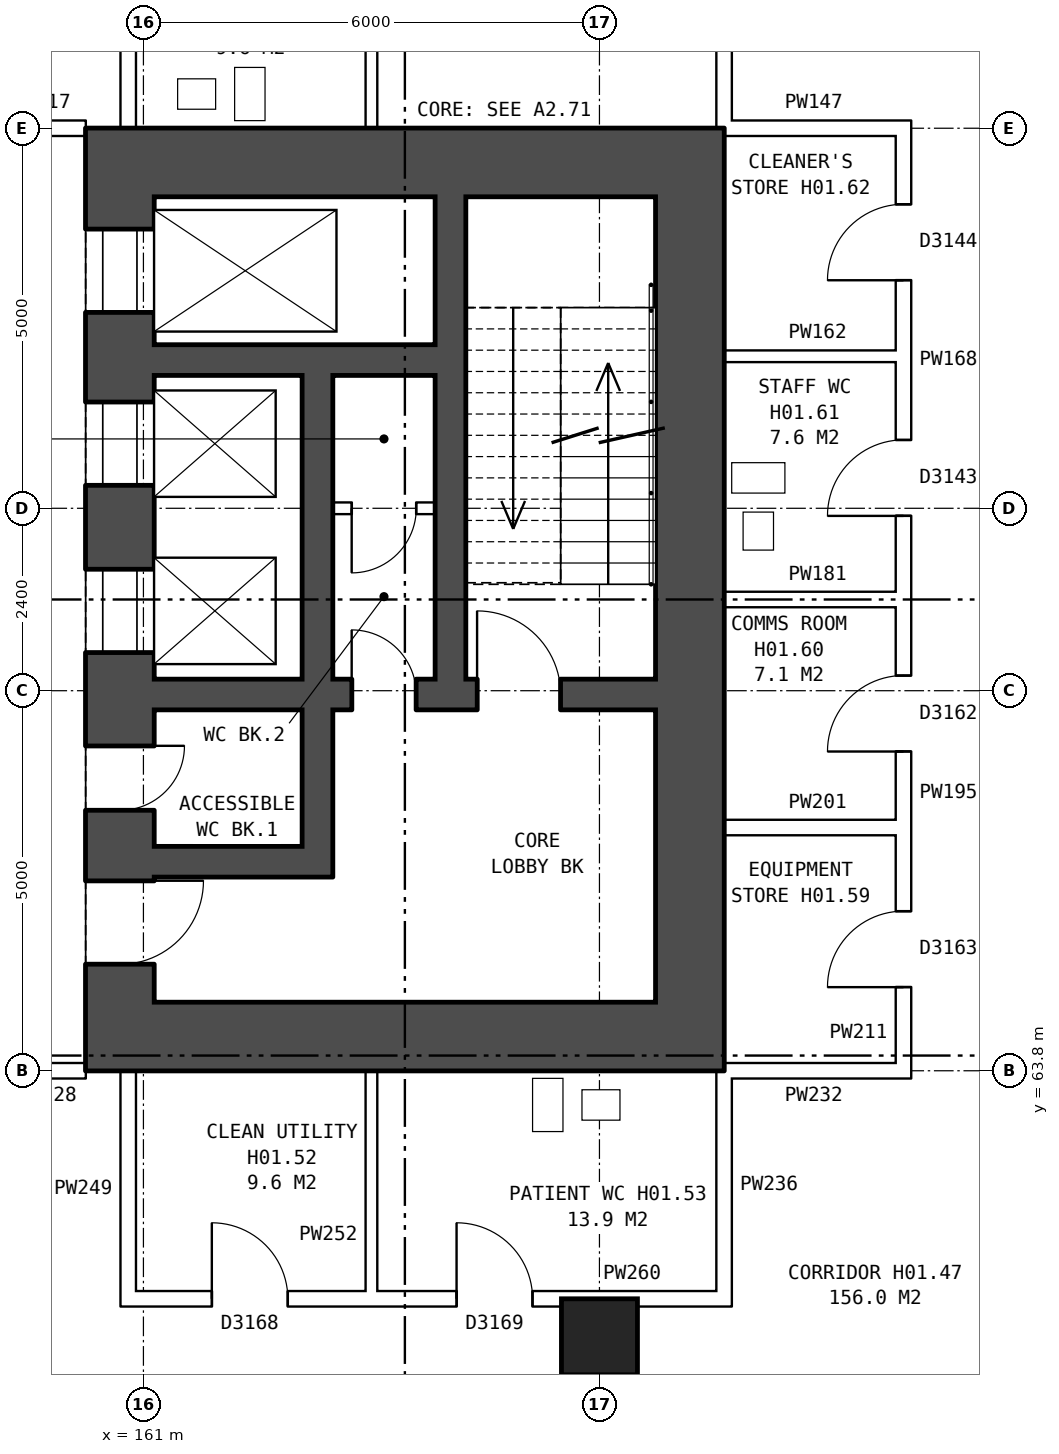
"""IFC4 building model, lengths in metres.
Left out: names, types, materials, properties, quantities, classifications, styles, units other than length and angle.
Written with IfcOpenShell. Run it as: python <this file> out.ifc"""

import sys

from ifc_helpers import new_model, si_unit, direction, frame, frame_2d, origin, origin_2d, place, context, subcontext, project, spatial, rectangle, extrude, element, fill, save


model = new_model("IFC4")
c1 = context("Model", 3, precision=1e-05, world=origin(), true_north=direction((0.0, 1.0)))
c2 = subcontext(c1, "Body", "Model", "MODEL_VIEW")
j1 = project(units=[si_unit("LENGTHUNIT", "METRE"), si_unit("PLANEANGLEUNIT", "RADIAN")], contexts=[c1])
p1 = place(None, origin())
s1 = spatial("IfcSite", under=j1, at=p1, CompositionType="ELEMENT")
p2 = place(p1, origin())
s2 = spatial("IfcBuilding", under=s1, at=p2, CompositionType="ELEMENT")
p3 = place(p2, frame((0.0, 0.0, 5.5)))
s3 = spatial("IfcBuildingStorey", under=s2, at=p3, CompositionType="ELEMENT", Elevation=5.5)
p4 = place(p3, frame((167.0, 60.3, 0.0), z_axis=(0.0, 0.0, 1.0), x_axis=(1.0, 0.0, 0.0)))
e1 = element("IfcColumn", 1, at=p4, inside=s3, PredefinedType="COLUMN", context=c2, shape_type="SweptSolid", body=[
    extrude(rectangle(XDim=1.0, YDim=1.0, at=origin_2d()), origin(), (0.0, 0.0, 1.0), 4.3),
])
p5 = place(p3, frame((160.69, 75.3, 0.0), z_axis=(0.0, 0.0, 1.0), x_axis=(0.0, -1.0, 0.0)))
e2 = element("IfcWall", 2, at=p5, inside=s3, PredefinedType="SHEAR", context=c2, shape_type="SweptSolid", body=[
    extrude(rectangle(XDim=10.6, YDim=0.9, at=frame_2d((5.3, 0.0))), origin(), (0.0, 0.0, 1.0), 4.3),
])
p6 = place(p5, frame((0.425, 0.0, 0.0)))
e3 = element("IfcOpeningElement", 3, at=p6, cuts=e2, PredefinedType="OPENING", context=c2, shape_type="SweptSolid", body=[
    extrude(rectangle(XDim=1.1, YDim=2.1, at=frame_2d((0.55, 1.05))), frame((0.0, 0.46, 0.0), z_axis=(0.0, -1.0, 0.0), x_axis=(1.0, 0.0, 0.0)), (0.0, 0.0, 1.0), 0.92),
])
p7 = place(p5, frame((2.7, 0.0, 0.0)))
e4 = element("IfcOpeningElement", 4, at=p7, cuts=e2, PredefinedType="OPENING", context=c2, shape_type="SweptSolid", body=[
    extrude(rectangle(XDim=1.1, YDim=2.1, at=frame_2d((0.55, 1.05))), frame((0.0, 0.46, 0.0), z_axis=(0.0, -1.0, 0.0), x_axis=(1.0, 0.0, 0.0)), (0.0, 0.0, 1.0), 0.92),
])
p8 = place(p5, frame((4.9, 0.0, 0.0)))
e5 = element("IfcOpeningElement", 5, at=p8, cuts=e2, PredefinedType="OPENING", context=c2, shape_type="SweptSolid", body=[
    extrude(rectangle(XDim=1.1, YDim=2.1, at=frame_2d((0.55, 1.05))), frame((0.0, 0.46, 0.0), z_axis=(0.0, -1.0, 0.0), x_axis=(1.0, 0.0, 0.0)), (0.0, 0.0, 1.0), 0.92),
])
p9 = place(p5, frame((9.0, 0.0, 0.0)))
e6 = element("IfcOpeningElement", 6, at=p9, cuts=e2, PredefinedType="OPENING", context=c2, shape_type="SweptSolid", body=[
    extrude(rectangle(XDim=1.1, YDim=2.1, at=frame_2d((0.55, 1.05))), frame((0.0, 0.46, 0.0), z_axis=(0.0, -1.0, 0.0), x_axis=(1.0, 0.0, 0.0)), (0.0, 0.0, 1.0), 0.92),
])
p10 = place(p5, frame((7.225, 0.0, 0.0)))
e7 = element("IfcOpeningElement", 7, at=p10, cuts=e2, PredefinedType="OPENING", context=c2, shape_type="SweptSolid", body=[
    extrude(rectangle(XDim=0.85, YDim=2.1, at=frame_2d((0.425, 1.05))), frame((0.0, 0.46, 0.0), z_axis=(0.0, -1.0, 0.0), x_axis=(1.0, 0.0, 0.0)), (0.0, 0.0, 1.0), 0.92),
])
p11 = place(p3, frame((168.19, 75.3, 0.0), z_axis=(0.0, 0.0, 1.0), x_axis=(0.0, -1.0, 0.0)))
e8 = element("IfcWall", 8, at=p11, inside=s3, PredefinedType="SHEAR", context=c2, shape_type="SweptSolid", body=[
    extrude(rectangle(XDim=10.6, YDim=0.9, at=frame_2d((5.3, 0.0))), origin(), (0.0, 0.0, 1.0), 4.3),
])
for number, where, z_axis, x_axis in (
    (9, (160.24, 75.75, 0.0), (0.0, 0.0, 1.0), (1.0, 0.0, 0.0)),
    (10, (160.24, 64.25, 0.0), (0.0, 0.0, 1.0), (1.0, 0.0, 0.0)),
):
    element("IfcWall", number, at=place(p3, frame(where, z_axis=z_axis, x_axis=x_axis)), inside=s3, PredefinedType="SHEAR", context=c2, shape_type="SweptSolid", body=[
        extrude(rectangle(XDim=8.4, YDim=0.9, at=frame_2d((4.2, 0.0))), origin(), (0.0, 0.0, 1.0), 4.3),
    ])
p12 = place(p3, frame((161.14, 73.15, 0.0), z_axis=(0.0, 0.0, 1.0), x_axis=(1.0, 0.0, 0.0)))
e11 = element("IfcWall", 11, at=p12, inside=s3, PredefinedType="SHEAR", context=c2, shape_type="SweptSolid", body=[
    extrude(rectangle(XDim=3.7, YDim=0.4, at=frame_2d((1.85, 0.0))), origin(), (0.0, 0.0, 1.0), 4.3),
])
p13 = place(p3, frame((163.49, 71.2, 0.0), z_axis=(0.0, 0.0, 1.0), x_axis=(1.0, 0.0, 0.0)))
e12 = element("IfcWall", 12, at=p13, inside=s3, PredefinedType="PARTITIONING", context=c2, shape_type="SweptSolid", body=[
    extrude(rectangle(XDim=1.35, YDim=0.15, at=frame_2d((0.675, 0.0))), origin(), (0.0, 0.0, 1.0), 4.3),
])
p14 = place(p13, frame((0.25, 0.0, 0.0)))
e13 = element("IfcOpeningElement", 13, at=p14, cuts=e12, PredefinedType="OPENING", context=c2, shape_type="SweptSolid", body=[
    extrude(rectangle(XDim=0.85, YDim=2.1, at=frame_2d((0.425, 1.05))), frame((0.0, 0.085, 0.0), z_axis=(0.0, -1.0, 0.0), x_axis=(1.0, 0.0, 0.0)), (0.0, 0.0, 1.0), 0.17),
])
p15 = place(p3, frame((161.14, 68.75, 0.0), z_axis=(0.0, 0.0, 1.0), x_axis=(1.0, 0.0, 0.0)))
e14 = element("IfcWall", 14, at=p15, inside=s3, PredefinedType="SHEAR", context=c2, shape_type="SweptSolid", body=[
    extrude(rectangle(XDim=6.6, YDim=0.4, at=frame_2d((3.3, 0.0))), origin(), (0.0, 0.0, 1.0), 4.3),
])
p16 = place(p15, frame((4.25, 0.0, 0.0)))
e15 = element("IfcOpeningElement", 15, at=p16, cuts=e14, PredefinedType="OPENING", context=c2, shape_type="SweptSolid", body=[
    extrude(rectangle(XDim=1.1, YDim=2.1, at=frame_2d((0.55, 1.05))), frame((0.0, 0.21, 0.0), z_axis=(0.0, -1.0, 0.0), x_axis=(1.0, 0.0, 0.0)), (0.0, 0.0, 1.0), 0.42),
])
p17 = place(p15, frame((2.6, 0.0, 0.0)))
e16 = element("IfcOpeningElement", 16, at=p17, cuts=e14, PredefinedType="OPENING", context=c2, shape_type="SweptSolid", body=[
    extrude(rectangle(XDim=0.85, YDim=2.1, at=frame_2d((0.425, 1.05))), frame((0.0, 0.21, 0.0), z_axis=(0.0, -1.0, 0.0), x_axis=(1.0, 0.0, 0.0)), (0.0, 0.0, 1.0), 0.42),
])
p18 = place(p3, frame((161.14, 66.55, 0.0), z_axis=(0.0, 0.0, 1.0), x_axis=(1.0, 0.0, 0.0)))
e17 = element("IfcWall", 17, at=p18, inside=s3, PredefinedType="SHEAR", context=c2, shape_type="SweptSolid", body=[
    extrude(rectangle(XDim=1.95, YDim=0.4, at=frame_2d((0.975, 0.0))), origin(), (0.0, 0.0, 1.0), 4.3),
])
p19 = place(p3, frame((163.29, 72.95, 0.0), z_axis=(0.0, 0.0, 1.0), x_axis=(0.0, -1.0, 0.0)))
e18 = element("IfcWall", 18, at=p19, inside=s3, PredefinedType="SHEAR", context=c2, shape_type="SweptSolid", body=[
    extrude(rectangle(XDim=4.0, YDim=0.4, at=frame_2d((2.0, 0.0))), origin(), (0.0, 0.0, 1.0), 4.3),
])
p20 = place(p3, frame((163.29, 68.55, 0.0), z_axis=(0.0, 0.0, 1.0), x_axis=(0.0, -1.0, 0.0)))
e19 = element("IfcWall", 19, at=p20, inside=s3, PredefinedType="SHEAR", context=c2, shape_type="SweptSolid", body=[
    extrude(rectangle(XDim=2.2, YDim=0.4, at=frame_2d((1.1, 0.0))), origin(), (0.0, 0.0, 1.0), 4.3),
])
p21 = place(p3, frame((165.04, 75.3, 0.0), z_axis=(0.0, 0.0, 1.0), x_axis=(0.0, -1.0, 0.0)))
e20 = element("IfcWall", 20, at=p21, inside=s3, PredefinedType="SHEAR", context=c2, shape_type="SweptSolid", body=[
    extrude(rectangle(XDim=6.35, YDim=0.4, at=frame_2d((3.175, 0.0))), origin(), (0.0, 0.0, 1.0), 4.3),
])
p22 = place(p3, frame((160.7, 60.8, 0.0), z_axis=(0.0, 0.0, 1.0), x_axis=(1.0, 0.0, 0.0)))
e21 = element("IfcWall", 21, at=p22, inside=s3, PredefinedType="PARTITIONING", context=c2, shape_type="SweptSolid", body=[
    extrude(rectangle(XDim=8.04, YDim=0.2, at=frame_2d((4.02, 0.0))), origin(), (0.0, 0.0, 1.0), 4.3),
])
p23 = place(p22, frame((1.2, 0.0, 0.0)))
e22 = element("IfcOpeningElement", 22, at=p23, cuts=e21, PredefinedType="OPENING", context=c2, shape_type="SweptSolid", body=[
    extrude(rectangle(XDim=1.0, YDim=2.1, at=frame_2d((0.5, 1.05))), frame((0.0, 0.11, 0.0), z_axis=(0.0, -1.0, 0.0), x_axis=(1.0, 0.0, 0.0)), (0.0, 0.0, 1.0), 0.22),
])
p24 = place(p22, frame((4.42, 0.0, 0.0)))
e23 = element("IfcOpeningElement", 23, at=p24, cuts=e21, PredefinedType="OPENING", context=c2, shape_type="SweptSolid", body=[
    extrude(rectangle(XDim=1.0, YDim=2.1, at=frame_2d((0.5, 1.05))), frame((0.0, 0.11, 0.0), z_axis=(0.0, -1.0, 0.0), x_axis=(1.0, 0.0, 0.0)), (0.0, 0.0, 1.0), 0.22),
])
p25 = place(p3, frame((168.54, 63.8, 0.0), z_axis=(0.0, 0.0, 1.0), x_axis=(1.0, 0.0, 0.0)))
e24 = element("IfcWall", 24, at=p25, inside=s3, PredefinedType="PARTITIONING", context=c2, shape_type="SweptSolid", body=[
    extrude(rectangle(XDim=2.56, YDim=0.2, at=frame_2d((1.28, 0.0))), origin(), (0.0, 0.0, 1.0), 4.3),
])
p26 = place(p3, frame((157.65, 63.8, 0.0), z_axis=(0.0, 0.0, 1.0), x_axis=(1.0, 0.0, 0.0)))
e25 = element("IfcWall", 25, at=p26, inside=s3, PredefinedType="PARTITIONING", context=c2, shape_type="SweptSolid", body=[
    extrude(rectangle(XDim=2.59, YDim=0.2, at=frame_2d((1.295, 0.0))), origin(), (0.0, 0.0, 1.0), 4.3),
])
p27 = place(p26, frame((0.59, 0.0, 0.0)))
e26 = element("IfcOpeningElement", 26, at=p27, cuts=e25, PredefinedType="OPENING", context=c2, shape_type="SweptSolid", body=[
    extrude(rectangle(XDim=1.0, YDim=2.1, at=frame_2d((0.5, 1.05))), frame((0.0, 0.11, 0.0), z_axis=(0.0, -1.0, 0.0), x_axis=(1.0, 0.0, 0.0)), (0.0, 0.0, 1.0), 0.22),
])
for number, where, z_axis, x_axis in (
    (27, (168.64, 67.0, 0.0), (0.0, 0.0, 1.0), (1.0, 0.0, 0.0)),
    (28, (168.64, 70.0, 0.0), (0.0, 0.0, 1.0), (1.0, 0.0, 0.0)),
):
    element("IfcWall", number, at=place(p3, frame(where, z_axis=z_axis, x_axis=x_axis)), inside=s3, PredefinedType="PARTITIONING", context=c2, shape_type="SweptSolid", body=[
        extrude(rectangle(XDim=2.46, YDim=0.2, at=frame_2d((1.23, 0.0))), origin(), (0.0, 0.0, 1.0), 4.3),
    ])
p28 = place(p3, frame((168.64, 73.2, 0.0), z_axis=(0.0, 0.0, 1.0), x_axis=(1.0, 0.0, 0.0)))
e29 = element("IfcWall", 29, at=p28, inside=s3, PredefinedType="PLUMBINGWALL", context=c2, shape_type="SweptSolid", body=[
    extrude(rectangle(XDim=2.46, YDim=0.15, at=frame_2d((1.23, 0.0))), origin(), (0.0, 0.0, 1.0), 4.3),
])
p29 = place(p3, frame((168.54, 76.2, 0.0), z_axis=(0.0, 0.0, 1.0), x_axis=(1.0, 0.0, 0.0)))
e30 = element("IfcWall", 30, at=p29, inside=s3, PredefinedType="PARTITIONING", context=c2, shape_type="SweptSolid", body=[
    extrude(rectangle(XDim=2.56, YDim=0.2, at=frame_2d((1.28, 0.0))), origin(), (0.0, 0.0, 1.0), 4.3),
])
p30 = place(p3, frame((157.65, 76.2, 0.0), z_axis=(0.0, 0.0, 1.0), x_axis=(1.0, 0.0, 0.0)))
e31 = element("IfcWall", 31, at=p30, inside=s3, PredefinedType="PARTITIONING", context=c2, shape_type="SweptSolid", body=[
    extrude(rectangle(XDim=2.59, YDim=0.2, at=frame_2d((1.295, 0.0))), origin(), (0.0, 0.0, 1.0), 4.3),
])
p31 = place(p30, frame((0.59, 0.0, 0.0)))
e32 = element("IfcOpeningElement", 32, at=p31, cuts=e31, PredefinedType="OPENING", context=c2, shape_type="SweptSolid", body=[
    extrude(rectangle(XDim=1.0, YDim=2.1, at=frame_2d((0.5, 1.05))), frame((0.0, 0.11, 0.0), z_axis=(0.0, -1.0, 0.0), x_axis=(1.0, 0.0, 0.0)), (0.0, 0.0, 1.0), 0.22),
])
for number, where, z_axis, x_axis in (
    (33, (160.8, 60.7, 0.0), (0.0, 0.0, 1.0), (0.0, 1.0, 0.0)),
    (34, (160.8, 76.2, 0.0), (0.0, 0.0, 1.0), (0.0, 1.0, 0.0)),
):
    element("IfcWall", number, at=place(p3, frame(where, z_axis=z_axis, x_axis=x_axis)), inside=s3, PredefinedType="PARTITIONING", context=c2, shape_type="SweptSolid", body=[
        extrude(rectangle(XDim=3.1, YDim=0.2, at=frame_2d((1.55, 0.0))), origin(), (0.0, 0.0, 1.0), 4.3),
    ])
for number, where, z_axis, x_axis in (
    (35, (164.0, 60.7, 0.0), (0.0, 0.0, 1.0), (0.0, 1.0, 0.0)),
    (36, (164.0, 76.2, 0.0), (0.0, 0.0, 1.0), (0.0, 1.0, 0.0)),
):
    element("IfcWall", number, at=place(p3, frame(where, z_axis=z_axis, x_axis=x_axis)), inside=s3, PredefinedType="PLUMBINGWALL", context=c2, shape_type="SweptSolid", body=[
        extrude(rectangle(XDim=3.1, YDim=0.15, at=frame_2d((1.55, 0.0))), origin(), (0.0, 0.0, 1.0), 4.3),
    ])
for number, where, z_axis, x_axis in (
    (37, (168.64, 60.7, 0.0), (0.0, 0.0, 1.0), (0.0, 1.0, 0.0)),
    (38, (168.64, 76.1, 0.0), (0.0, 0.0, 1.0), (0.0, 1.0, 0.0)),
):
    element("IfcWall", number, at=place(p3, frame(where, z_axis=z_axis, x_axis=x_axis)), inside=s3, PredefinedType="PARTITIONING", context=c2, shape_type="SweptSolid", body=[
        extrude(rectangle(XDim=3.2, YDim=0.2, at=frame_2d((1.6, 0.0))), origin(), (0.0, 0.0, 1.0), 4.3),
    ])
p32 = place(p3, frame((171.0, 66.9, 0.0), z_axis=(0.0, 0.0, 1.0), x_axis=(0.0, 1.0, 0.0)))
e39 = element("IfcWall", 39, at=p32, inside=s3, PredefinedType="PARTITIONING", context=c2, shape_type="SweptSolid", body=[
    extrude(rectangle(XDim=3.2, YDim=0.2, at=frame_2d((1.6, 0.0))), origin(), (0.0, 0.0, 1.0), 4.3),
])
p33 = place(p32, frame((1.1, 0.0, 0.0)))
e40 = element("IfcOpeningElement", 40, at=p33, cuts=e39, PredefinedType="OPENING", context=c2, shape_type="SweptSolid", body=[
    extrude(rectangle(XDim=1.0, YDim=2.1, at=frame_2d((0.5, 1.05))), frame((0.0, 0.11, 0.0), z_axis=(0.0, -1.0, 0.0), x_axis=(1.0, 0.0, 0.0)), (0.0, 0.0, 1.0), 0.22),
])
p34 = place(p3, frame((171.0, 63.7, 0.0), z_axis=(0.0, 0.0, 1.0), x_axis=(0.0, 1.0, 0.0)))
e41 = element("IfcWall", 41, at=p34, inside=s3, PredefinedType="PARTITIONING", context=c2, shape_type="SweptSolid", body=[
    extrude(rectangle(XDim=3.4, YDim=0.2, at=frame_2d((1.7, 0.0))), origin(), (0.0, 0.0, 1.0), 4.3),
])
p35 = place(p34, frame((1.2, 0.0, 0.0)))
e42 = element("IfcOpeningElement", 42, at=p35, cuts=e41, PredefinedType="OPENING", context=c2, shape_type="SweptSolid", body=[
    extrude(rectangle(XDim=1.0, YDim=2.1, at=frame_2d((0.5, 1.05))), frame((0.0, 0.11, 0.0), z_axis=(0.0, -1.0, 0.0), x_axis=(1.0, 0.0, 0.0)), (0.0, 0.0, 1.0), 0.22),
])
p36 = place(p3, frame((171.0, 69.9, 0.0), z_axis=(0.0, 0.0, 1.0), x_axis=(0.0, 1.0, 0.0)))
e43 = element("IfcWall", 43, at=p36, inside=s3, PredefinedType="PARTITIONING", context=c2, shape_type="SweptSolid", body=[
    extrude(rectangle(XDim=6.4, YDim=0.2, at=frame_2d((3.2, 0.0))), origin(), (0.0, 0.0, 1.0), 4.3),
])
p37 = place(p36, frame((1.2, 0.0, 0.0)))
e44 = element("IfcOpeningElement", 44, at=p37, cuts=e43, PredefinedType="OPENING", context=c2, shape_type="SweptSolid", body=[
    extrude(rectangle(XDim=1.0, YDim=2.1, at=frame_2d((0.5, 1.05))), frame((0.0, 0.11, 0.0), z_axis=(0.0, -1.0, 0.0), x_axis=(1.0, 0.0, 0.0)), (0.0, 0.0, 1.0), 0.22),
])
p38 = place(p36, frame((4.3, 0.0, 0.0)))
e45 = element("IfcOpeningElement", 45, at=p38, cuts=e43, PredefinedType="OPENING", context=c2, shape_type="SweptSolid", body=[
    extrude(rectangle(XDim=1.0, YDim=2.1, at=frame_2d((0.5, 1.05))), frame((0.0, 0.11, 0.0), z_axis=(0.0, -1.0, 0.0), x_axis=(1.0, 0.0, 0.0)), (0.0, 0.0, 1.0), 0.22),
])
p39 = place(p6, origin())
e46 = element("IfcDoor", 46, at=p39, inside=s3, OperationType="DOUBLE_DOOR_SLIDING", PredefinedType="DOOR", context=c2, shape_type="SweptSolid", body=[
    extrude(rectangle(XDim=1.1, YDim=2.1, at=frame_2d((0.55, 1.05))), frame((0.0, 0.435, 0.0), z_axis=(0.0, -1.0, 0.0), x_axis=(1.0, 0.0, 0.0)), (0.0, 0.0, 1.0), 0.05),
])
fill(e3, e46)
p40 = place(p7, origin())
e47 = element("IfcDoor", 47, at=p40, inside=s3, OperationType="DOUBLE_DOOR_SLIDING", PredefinedType="DOOR", context=c2, shape_type="SweptSolid", body=[
    extrude(rectangle(XDim=1.1, YDim=2.1, at=frame_2d((0.55, 1.05))), frame((0.0, 0.435, 0.0), z_axis=(0.0, -1.0, 0.0), x_axis=(1.0, 0.0, 0.0)), (0.0, 0.0, 1.0), 0.05),
])
fill(e4, e47)
p41 = place(p8, origin())
e48 = element("IfcDoor", 48, at=p41, inside=s3, OperationType="DOUBLE_DOOR_SLIDING", PredefinedType="DOOR", context=c2, shape_type="SweptSolid", body=[
    extrude(rectangle(XDim=1.1, YDim=2.1, at=frame_2d((0.55, 1.05))), frame((0.0, 0.435, 0.0), z_axis=(0.0, -1.0, 0.0), x_axis=(1.0, 0.0, 0.0)), (0.0, 0.0, 1.0), 0.05),
])
fill(e5, e48)
p42 = place(p9, origin())
e49 = element("IfcDoor", 49, at=p42, inside=s3, OperationType="SINGLE_SWING_LEFT", PredefinedType="DOOR", context=c2, shape_type="SweptSolid", body=[
    extrude(rectangle(XDim=1.1, YDim=2.1, at=frame_2d((0.55, 1.05))), frame((0.0, 0.435, 0.0), z_axis=(0.0, -1.0, 0.0), x_axis=(1.0, 0.0, 0.0)), (0.0, 0.0, 1.0), 0.05),
])
fill(e6, e49)
p43 = place(p16, origin())
e50 = element("IfcDoor", 50, at=p43, inside=s3, OperationType="SINGLE_SWING_LEFT", PredefinedType="DOOR", context=c2, shape_type="SweptSolid", body=[
    extrude(rectangle(XDim=1.1, YDim=2.1, at=frame_2d((0.55, 1.05))), frame((0.0, 0.025, 0.0), z_axis=(0.0, -1.0, 0.0), x_axis=(1.0, 0.0, 0.0)), (0.0, 0.0, 1.0), 0.05),
])
fill(e15, e50)
p44 = place(p10, origin())
e51 = element("IfcDoor", 51, at=p44, inside=s3, OperationType="SINGLE_SWING_LEFT", PredefinedType="DOOR", context=c2, shape_type="SweptSolid", body=[
    extrude(rectangle(XDim=0.85, YDim=2.1, at=frame_2d((0.425, 1.05))), frame((0.0, 0.435, 0.0), z_axis=(0.0, -1.0, 0.0), x_axis=(1.0, 0.0, 0.0)), (0.0, 0.0, 1.0), 0.05),
])
fill(e7, e51)
p45 = place(p17, origin())
e52 = element("IfcDoor", 52, at=p45, inside=s3, OperationType="SINGLE_SWING_LEFT", PredefinedType="DOOR", context=c2, shape_type="SweptSolid", body=[
    extrude(rectangle(XDim=0.85, YDim=2.1, at=frame_2d((0.425, 1.05))), frame((0.0, 0.025, 0.0), z_axis=(0.0, -1.0, 0.0), x_axis=(1.0, 0.0, 0.0)), (0.0, 0.0, 1.0), 0.05),
])
fill(e16, e52)
p46 = place(p14, frame((0.85, 0.0, 0.0), z_axis=(0.0, 0.0, 1.0), x_axis=(-1.0, 0.0, 0.0)))
e53 = element("IfcDoor", 53, at=p46, inside=s3, OperationType="SINGLE_SWING_RIGHT", PredefinedType="DOOR", context=c2, shape_type="SweptSolid", body=[
    extrude(rectangle(XDim=0.85, YDim=2.1, at=frame_2d((0.425, 1.05))), frame((0.0, 0.025, 0.0), z_axis=(0.0, -1.0, 0.0), x_axis=(1.0, 0.0, 0.0)), (0.0, 0.0, 1.0), 0.05),
])
fill(e13, e53)
p47 = place(p23, origin())
e54 = element("IfcDoor", 54, at=p47, inside=s3, OperationType="SINGLE_SWING_LEFT", PredefinedType="DOOR", context=c2, shape_type="SweptSolid", body=[
    extrude(rectangle(XDim=1.0, YDim=2.1, at=frame_2d((0.5, 1.05))), frame((0.0, 0.025, 0.0), z_axis=(0.0, -1.0, 0.0), x_axis=(1.0, 0.0, 0.0)), (0.0, 0.0, 1.0), 0.05),
])
fill(e22, e54)
p48 = place(p24, origin())
e55 = element("IfcDoor", 55, at=p48, inside=s3, OperationType="SINGLE_SWING_LEFT", PredefinedType="DOOR", context=c2, shape_type="SweptSolid", body=[
    extrude(rectangle(XDim=1.0, YDim=2.1, at=frame_2d((0.5, 1.05))), frame((0.0, 0.025, 0.0), z_axis=(0.0, -1.0, 0.0), x_axis=(1.0, 0.0, 0.0)), (0.0, 0.0, 1.0), 0.05),
])
fill(e23, e55)
p49 = place(p33, origin())
e56 = element("IfcDoor", 56, at=p49, inside=s3, OperationType="SINGLE_SWING_LEFT", PredefinedType="DOOR", context=c2, shape_type="SweptSolid", body=[
    extrude(rectangle(XDim=1.0, YDim=2.1, at=frame_2d((0.5, 1.05))), frame((0.0, 0.025, 0.0), z_axis=(0.0, -1.0, 0.0), x_axis=(1.0, 0.0, 0.0)), (0.0, 0.0, 1.0), 0.05),
])
fill(e40, e56)
p50 = place(p35, origin())
e57 = element("IfcDoor", 57, at=p50, inside=s3, OperationType="SINGLE_SWING_LEFT", PredefinedType="DOOR", context=c2, shape_type="SweptSolid", body=[
    extrude(rectangle(XDim=1.0, YDim=2.1, at=frame_2d((0.5, 1.05))), frame((0.0, 0.025, 0.0), z_axis=(0.0, -1.0, 0.0), x_axis=(1.0, 0.0, 0.0)), (0.0, 0.0, 1.0), 0.05),
])
fill(e42, e57)
p51 = place(p37, origin())
e58 = element("IfcDoor", 58, at=p51, inside=s3, OperationType="SINGLE_SWING_LEFT", PredefinedType="DOOR", context=c2, shape_type="SweptSolid", body=[
    extrude(rectangle(XDim=1.0, YDim=2.1, at=frame_2d((0.5, 1.05))), frame((0.0, 0.025, 0.0), z_axis=(0.0, -1.0, 0.0), x_axis=(1.0, 0.0, 0.0)), (0.0, 0.0, 1.0), 0.05),
])
fill(e44, e58)
p52 = place(p38, origin())
e59 = element("IfcDoor", 59, at=p52, inside=s3, OperationType="SINGLE_SWING_LEFT", PredefinedType="DOOR", context=c2, shape_type="SweptSolid", body=[
    extrude(rectangle(XDim=1.0, YDim=2.1, at=frame_2d((0.5, 1.05))), frame((0.0, 0.025, 0.0), z_axis=(0.0, -1.0, 0.0), x_axis=(1.0, 0.0, 0.0)), (0.0, 0.0, 1.0), 0.05),
])
fill(e45, e59)
save(model, sys.argv[1])
